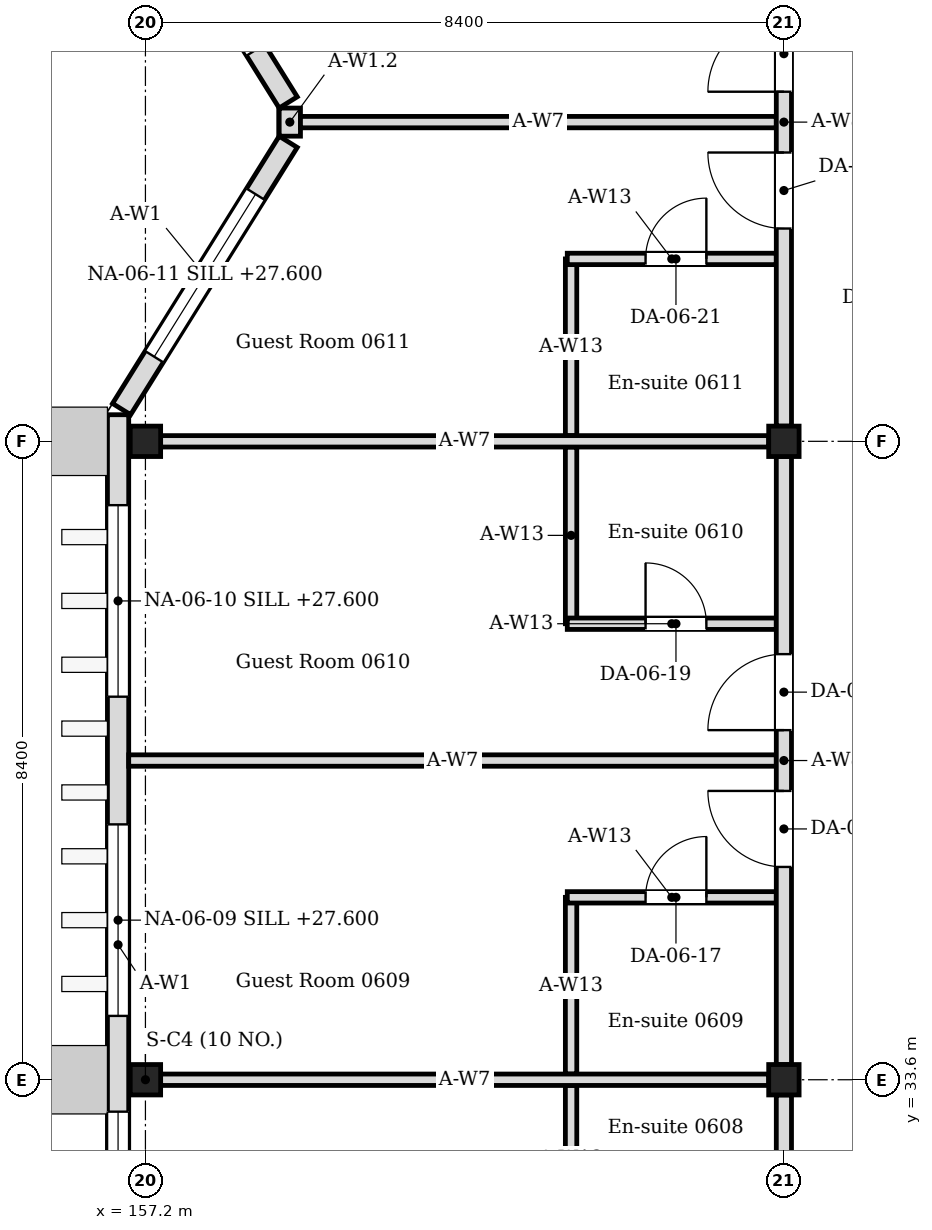
"""IFC4 building model, lengths in metres.
Left out: names, types, materials, properties, quantities, classifications, styles, units other than length and angle.
Written with IfcOpenShell. Run it as: python <this file> out.ifc"""

import sys

from ifc_helpers import new_model, si_unit, direction, frame, frame_2d, origin, origin_2d, place, context, subcontext, project, spatial, rectangle, i_section, extrude, element, fill, save


model = new_model("IFC4")
c1 = context("Model", 3, precision=1e-05, world=origin(), true_north=direction((0.0, 1.0)))
c2 = subcontext(c1, "Body", "Model", "MODEL_VIEW")
j1 = project(units=[si_unit("LENGTHUNIT", "METRE"), si_unit("PLANEANGLEUNIT", "RADIAN")], contexts=[c1])
p1 = place(None, origin())
s1 = spatial("IfcSite", under=j1, at=p1, CompositionType="ELEMENT")
p2 = place(p1, origin())
s2 = spatial("IfcBuilding", under=s1, at=p2, CompositionType="ELEMENT")
p3 = place(p2, frame((0.0, 0.0, 27.0)))
s3 = spatial("IfcBuildingStorey", under=s2, at=p3, CompositionType="ELEMENT", Elevation=27.0)
for number, where, z_axis, x_axis in (
    (1, (157.2, 33.6, 0.0), (0.0, 0.0, 1.0), (1.0, 0.0, 0.0)),
    (2, (157.2, 42.0, 0.0), (0.0, 0.0, 1.0), (1.0, 0.0, 0.0)),
    (3, (165.6, 33.6, 0.0), (0.0, 0.0, 1.0), (1.0, 0.0, 0.0)),
    (4, (165.6, 42.0, 0.0), (0.0, 0.0, 1.0), (1.0, 0.0, 0.0)),
):
    element("IfcColumn", number, at=place(p3, frame(where, z_axis=z_axis, x_axis=x_axis)), inside=s3, PredefinedType="COLUMN", context=c2, shape_type="SweptSolid", body=[
        extrude(i_section(OverallWidth=0.4, OverallDepth=0.4, WebThickness=0.013, FlangeThickness=0.021, FilletRadius=0.022, at=origin_2d()), origin(), (0.0, 0.0, 1.0), 4.2),
    ])
p4 = place(p3, frame((156.84, 16.45, 0.0), z_axis=(0.0, 0.0, 1.0), x_axis=(0.0, 1.0, 0.0)))
e5 = element("IfcWall", 5, at=p4, inside=s3, PredefinedType="SOLIDWALL", context=c2, shape_type="SweptSolid", body=[
    extrude(rectangle(XDim=25.9, YDim=0.28, at=frame_2d((12.95, 0.0))), origin(), (0.0, 0.0, 1.0), 4.05),
])
p5 = place(p4, frame((1.19, 0.0, 0.6)))
e6 = element("IfcOpeningElement", 6, at=p5, cuts=e5, PredefinedType="OPENING", context=c2, shape_type="SweptSolid", body=[
    extrude(rectangle(XDim=2.52, YDim=2.4, at=frame_2d((1.26, 1.2))), frame((0.0, 0.15, 0.0), z_axis=(0.0, -1.0, 0.0), x_axis=(1.0, 0.0, 0.0)), (0.0, 0.0, 1.0), 0.3),
])
p6 = place(p4, frame((5.39, 0.0, 0.6)))
e7 = element("IfcOpeningElement", 7, at=p6, cuts=e5, PredefinedType="OPENING", context=c2, shape_type="SweptSolid", body=[
    extrude(rectangle(XDim=2.52, YDim=2.4, at=frame_2d((1.26, 1.2))), frame((0.0, 0.15, 0.0), z_axis=(0.0, -1.0, 0.0), x_axis=(1.0, 0.0, 0.0)), (0.0, 0.0, 1.0), 0.3),
])
p7 = place(p4, frame((10.01, 0.0, 0.6)))
e8 = element("IfcOpeningElement", 8, at=p7, cuts=e5, PredefinedType="OPENING", context=c2, shape_type="SweptSolid", body=[
    extrude(rectangle(XDim=2.52, YDim=2.4, at=frame_2d((1.26, 1.2))), frame((0.0, 0.15, 0.0), z_axis=(0.0, -1.0, 0.0), x_axis=(1.0, 0.0, 0.0)), (0.0, 0.0, 1.0), 0.3),
])
p8 = place(p4, frame((14.21, 0.0, 0.6)))
e9 = element("IfcOpeningElement", 9, at=p8, cuts=e5, PredefinedType="OPENING", context=c2, shape_type="SweptSolid", body=[
    extrude(rectangle(XDim=2.52, YDim=2.4, at=frame_2d((1.26, 1.2))), frame((0.0, 0.15, 0.0), z_axis=(0.0, -1.0, 0.0), x_axis=(1.0, 0.0, 0.0)), (0.0, 0.0, 1.0), 0.3),
])
p9 = place(p4, frame((17.99, 0.0, 0.6)))
e10 = element("IfcOpeningElement", 10, at=p9, cuts=e5, PredefinedType="OPENING", context=c2, shape_type="SweptSolid", body=[
    extrude(rectangle(XDim=2.52, YDim=2.4, at=frame_2d((1.26, 1.2))), frame((0.0, 0.15, 0.0), z_axis=(0.0, -1.0, 0.0), x_axis=(1.0, 0.0, 0.0)), (0.0, 0.0, 1.0), 0.3),
])
p10 = place(p4, frame((22.19, 0.0, 0.6)))
e11 = element("IfcOpeningElement", 11, at=p10, cuts=e5, PredefinedType="OPENING", context=c2, shape_type="SweptSolid", body=[
    extrude(rectangle(XDim=2.52, YDim=2.4, at=frame_2d((1.26, 1.2))), frame((0.0, 0.15, 0.0), z_axis=(0.0, -1.0, 0.0), x_axis=(1.0, 0.0, 0.0)), (0.0, 0.0, 1.0), 0.3),
])
p11 = place(p3, frame((156.886, 42.424, 0.0), z_axis=(0.0, 0.0, 1.0), x_axis=(0.529018946142, 0.848610013271, 0.0)))
e12 = element("IfcWall", 12, at=p11, inside=s3, PredefinedType="SOLIDWALL", context=c2, shape_type="SweptSolid", body=[
    extrude(rectangle(XDim=4.144, YDim=0.28, at=frame_2d((2.072, 0.0))), origin(), (0.0, 0.0, 1.0), 4.05),
])
p12 = place(p11, frame((0.812, 0.0, 0.6)))
e13 = element("IfcOpeningElement", 13, at=p12, cuts=e12, PredefinedType="OPENING", context=c2, shape_type="SweptSolid", body=[
    extrude(rectangle(XDim=2.52, YDim=2.4, at=frame_2d((1.26, 1.2))), frame((0.0, 0.15, 0.0), z_axis=(0.0, -1.0, 0.0), x_axis=(1.0, 0.0, 0.0)), (0.0, 0.0, 1.0), 0.3),
])
p13 = place(p3, frame((159.079, 46.459, 0.0), z_axis=(0.0, 0.0, 1.0), x_axis=(-0.529018946142, 0.848610013271, 0.0)))
e14 = element("IfcWall", 14, at=p13, inside=s3, PredefinedType="SOLIDWALL", context=c2, shape_type="SweptSolid", body=[
    extrude(rectangle(XDim=4.144, YDim=0.28, at=frame_2d((2.072, 0.0))), origin(), (0.0, 0.0, 1.0), 4.05),
])
p14 = place(p13, frame((0.812, 0.0, 0.6)))
e15 = element("IfcOpeningElement", 15, at=p14, cuts=e14, PredefinedType="OPENING", context=c2, shape_type="SweptSolid", body=[
    extrude(rectangle(XDim=2.52, YDim=2.4, at=frame_2d((1.26, 1.2))), frame((0.0, 0.15, 0.0), z_axis=(0.0, -1.0, 0.0), x_axis=(1.0, 0.0, 0.0)), (0.0, 0.0, 1.0), 0.3),
])
p15 = place(p3, frame((159.1, 46.015, 0.0), z_axis=(0.0, 0.0, 1.0), x_axis=(0.0, 1.0, 0.0)))
e16 = element("IfcWall", 16, at=p15, inside=s3, PredefinedType="SOLIDWALL", context=c2, shape_type="SweptSolid", body=[
    extrude(rectangle(XDim=0.37, YDim=0.28, at=frame_2d((0.185, 0.0))), origin(), (0.0, 0.0, 1.0), 3.604),
])
p16 = place(p3, frame((162.8, 31.6, 0.0), z_axis=(0.0, 0.0, 1.0), x_axis=(0.0, 1.0, 0.0)))
e17 = element("IfcWall", 17, at=p16, inside=s3, PredefinedType="PARTITIONING", context=c2, shape_type="SweptSolid", body=[
    extrude(rectangle(XDim=1.925, YDim=0.15, at=frame_2d((0.962, 0.0))), origin(), (0.0, 0.0, 1.0), 4.05),
])
p17 = place(p3, frame((162.8, 33.675, 0.0), z_axis=(0.0, 0.0, 1.0), x_axis=(0.0, 1.0, 0.0)))
e18 = element("IfcWall", 18, at=p17, inside=s3, PredefinedType="PARTITIONING", context=c2, shape_type="SweptSolid", body=[
    extrude(rectangle(XDim=2.325, YDim=0.15, at=frame_2d((1.163, 0.0))), origin(), (0.0, 0.0, 1.0), 4.05),
])
p18 = place(p3, frame((162.75, 36.0, 0.0), z_axis=(0.0, 0.0, 1.0), x_axis=(1.0, 0.0, 0.0)))
e19 = element("IfcWall", 19, at=p18, inside=s3, PredefinedType="PARTITIONING", context=c2, shape_type="SweptSolid", body=[
    extrude(rectangle(XDim=2.75, YDim=0.15, at=frame_2d((1.375, 0.0))), origin(), (0.0, 0.0, 1.0), 4.05),
])
p19 = place(p18, frame((1.03, 0.0, 0.0)))
e20 = element("IfcOpeningElement", 20, at=p19, cuts=e19, PredefinedType="OPENING", context=c2, shape_type="SweptSolid", body=[
    extrude(rectangle(XDim=0.8, YDim=2.1, at=frame_2d((0.4, 1.05))), frame((0.0, 0.085, 0.0), z_axis=(0.0, -1.0, 0.0), x_axis=(1.0, 0.0, 0.0)), (0.0, 0.0, 1.0), 0.17),
])
p20 = place(p3, frame((162.8, 39.6, 0.0), z_axis=(0.0, 0.0, 1.0), x_axis=(0.0, 1.0, 0.0)))
e21 = element("IfcWall", 21, at=p20, inside=s3, PredefinedType="PARTITIONING", context=c2, shape_type="SweptSolid", body=[
    extrude(rectangle(XDim=2.325, YDim=0.15, at=frame_2d((1.163, 0.0))), origin(), (0.0, 0.0, 1.0), 4.05),
])
p21 = place(p3, frame((162.75, 39.6, 0.0), z_axis=(0.0, 0.0, 1.0), x_axis=(1.0, 0.0, 0.0)))
e22 = element("IfcWall", 22, at=p21, inside=s3, PredefinedType="PARTITIONING", context=c2, shape_type="SweptSolid", body=[
    extrude(rectangle(XDim=2.75, YDim=0.15, at=frame_2d((1.375, 0.0))), origin(), (0.0, 0.0, 1.0), 4.05),
])
p22 = place(p21, frame((1.03, 0.0, 0.0)))
e23 = element("IfcOpeningElement", 23, at=p22, cuts=e22, PredefinedType="OPENING", context=c2, shape_type="SweptSolid", body=[
    extrude(rectangle(XDim=0.8, YDim=2.1, at=frame_2d((0.4, 1.05))), frame((0.0, 0.085, 0.0), z_axis=(0.0, -1.0, 0.0), x_axis=(1.0, 0.0, 0.0)), (0.0, 0.0, 1.0), 0.17),
])
p23 = place(p3, frame((162.8, 42.075, 0.0), z_axis=(0.0, 0.0, 1.0), x_axis=(0.0, 1.0, 0.0)))
e24 = element("IfcWall", 24, at=p23, inside=s3, PredefinedType="PARTITIONING", context=c2, shape_type="SweptSolid", body=[
    extrude(rectangle(XDim=2.325, YDim=0.15, at=frame_2d((1.163, 0.0))), origin(), (0.0, 0.0, 1.0), 4.05),
])
p24 = place(p3, frame((162.75, 44.4, 0.0), z_axis=(0.0, 0.0, 1.0), x_axis=(1.0, 0.0, 0.0)))
e25 = element("IfcWall", 25, at=p24, inside=s3, PredefinedType="PARTITIONING", context=c2, shape_type="SweptSolid", body=[
    extrude(rectangle(XDim=2.75, YDim=0.15, at=frame_2d((1.375, 0.0))), origin(), (0.0, 0.0, 1.0), 4.05),
])
p25 = place(p24, frame((1.03, 0.0, 0.0)))
e26 = element("IfcOpeningElement", 26, at=p25, cuts=e25, PredefinedType="OPENING", context=c2, shape_type="SweptSolid", body=[
    extrude(rectangle(XDim=0.8, YDim=2.1, at=frame_2d((0.4, 1.05))), frame((0.0, 0.085, 0.0), z_axis=(0.0, -1.0, 0.0), x_axis=(1.0, 0.0, 0.0)), (0.0, 0.0, 1.0), 0.17),
])
for number, where, z_axis, x_axis in (
    (27, (157.4, 33.6, 0.0), (0.0, 0.0, 1.0), (1.0, 0.0, 0.0)),
    (28, (157.4, 42.0, 0.0), (0.0, 0.0, 1.0), (1.0, 0.0, 0.0)),
):
    element("IfcWall", number, at=place(p3, frame(where, z_axis=z_axis, x_axis=x_axis)), inside=s3, PredefinedType="PARTITIONING", context=c2, shape_type="SweptSolid", body=[
        extrude(rectangle(XDim=8.0, YDim=0.15, at=frame_2d((4.0, 0.0))), origin(), (0.0, 0.0, 1.0), 3.604),
    ])
p26 = place(p3, frame((156.98, 37.8, 0.0), z_axis=(0.0, 0.0, 1.0), x_axis=(1.0, 0.0, 0.0)))
e29 = element("IfcWall", 29, at=p26, inside=s3, PredefinedType="PARTITIONING", context=c2, shape_type="SweptSolid", body=[
    extrude(rectangle(XDim=8.52, YDim=0.15, at=frame_2d((4.26, 0.0))), origin(), (0.0, 0.0, 1.0), 3.604),
])
p27 = place(p3, frame((159.24, 46.2, 0.0), z_axis=(0.0, 0.0, 1.0), x_axis=(1.0, 0.0, 0.0)))
e30 = element("IfcWall", 30, at=p27, inside=s3, PredefinedType="PARTITIONING", context=c2, shape_type="SweptSolid", body=[
    extrude(rectangle(XDim=6.26, YDim=0.15, at=frame_2d((3.13, 0.0))), origin(), (0.0, 0.0, 1.0), 3.604),
])
p28 = place(p3, frame((165.6, 25.4, 0.0), z_axis=(0.0, 0.0, 1.0), x_axis=(0.0, 1.0, 0.0)))
e31 = element("IfcWall", 31, at=p28, inside=s3, PredefinedType="PARTITIONING", context=c2, shape_type="SweptSolid", body=[
    extrude(rectangle(XDim=8.0, YDim=0.2, at=frame_2d((4.0, 0.0))), origin(), (0.0, 0.0, 1.0), 3.45),
])
p29 = place(p28, frame((3.02, 0.0, 0.0)))
e32 = element("IfcOpeningElement", 32, at=p29, cuts=e31, PredefinedType="OPENING", context=c2, shape_type="SweptSolid", body=[
    extrude(rectangle(XDim=1.0, YDim=2.4, at=frame_2d((0.5, 1.2))), frame((0.0, 0.11, 0.0), z_axis=(0.0, -1.0, 0.0), x_axis=(1.0, 0.0, 0.0)), (0.0, 0.0, 1.0), 0.22),
])
p30 = place(p28, frame((5.02, 0.0, 0.0)))
e33 = element("IfcOpeningElement", 33, at=p30, cuts=e31, PredefinedType="OPENING", context=c2, shape_type="SweptSolid", body=[
    extrude(rectangle(XDim=1.0, YDim=2.4, at=frame_2d((0.5, 1.2))), frame((0.0, 0.11, 0.0), z_axis=(0.0, -1.0, 0.0), x_axis=(1.0, 0.0, 0.0)), (0.0, 0.0, 1.0), 0.22),
])
p31 = place(p3, frame((165.6, 33.8, 0.0), z_axis=(0.0, 0.0, 1.0), x_axis=(0.0, 1.0, 0.0)))
e34 = element("IfcWall", 34, at=p31, inside=s3, PredefinedType="PARTITIONING", context=c2, shape_type="SweptSolid", body=[
    extrude(rectangle(XDim=8.0, YDim=0.2, at=frame_2d((4.0, 0.0))), origin(), (0.0, 0.0, 1.0), 3.45),
])
p32 = place(p31, frame((2.6, 0.0, 0.0)))
e35 = element("IfcOpeningElement", 35, at=p32, cuts=e34, PredefinedType="OPENING", context=c2, shape_type="SweptSolid", body=[
    extrude(rectangle(XDim=1.0, YDim=2.4, at=frame_2d((0.5, 1.2))), frame((0.0, 0.11, 0.0), z_axis=(0.0, -1.0, 0.0), x_axis=(1.0, 0.0, 0.0)), (0.0, 0.0, 1.0), 0.22),
])
p33 = place(p31, frame((4.4, 0.0, 0.0)))
e36 = element("IfcOpeningElement", 36, at=p33, cuts=e34, PredefinedType="OPENING", context=c2, shape_type="SweptSolid", body=[
    extrude(rectangle(XDim=1.0, YDim=2.4, at=frame_2d((0.5, 1.2))), frame((0.0, 0.11, 0.0), z_axis=(0.0, -1.0, 0.0), x_axis=(1.0, 0.0, 0.0)), (0.0, 0.0, 1.0), 0.22),
])
p34 = place(p3, frame((165.6, 42.2, 0.0), z_axis=(0.0, 0.0, 1.0), x_axis=(0.0, 1.0, 0.0)))
e37 = element("IfcWall", 37, at=p34, inside=s3, PredefinedType="PARTITIONING", context=c2, shape_type="SweptSolid", body=[
    extrude(rectangle(XDim=8.0, YDim=0.2, at=frame_2d((4.0, 0.0))), origin(), (0.0, 0.0, 1.0), 3.45),
])
p35 = place(p34, frame((2.6, 0.0, 0.0)))
e38 = element("IfcOpeningElement", 38, at=p35, cuts=e37, PredefinedType="OPENING", context=c2, shape_type="SweptSolid", body=[
    extrude(rectangle(XDim=1.0, YDim=2.4, at=frame_2d((0.5, 1.2))), frame((0.0, 0.11, 0.0), z_axis=(0.0, -1.0, 0.0), x_axis=(1.0, 0.0, 0.0)), (0.0, 0.0, 1.0), 0.22),
])
p36 = place(p34, frame((4.4, 0.0, 0.0)))
e39 = element("IfcOpeningElement", 39, at=p36, cuts=e37, PredefinedType="OPENING", context=c2, shape_type="SweptSolid", body=[
    extrude(rectangle(XDim=1.0, YDim=2.4, at=frame_2d((0.5, 1.2))), frame((0.0, 0.11, 0.0), z_axis=(0.0, -1.0, 0.0), x_axis=(1.0, 0.0, 0.0)), (0.0, 0.0, 1.0), 0.22),
])
p37 = place(p8, origin())
e40 = element("IfcWindow", 40, at=p37, inside=s3, PartitioningType="SINGLE_PANEL", PredefinedType="WINDOW", context=c2, shape_type="SweptSolid", body=[
    extrude(rectangle(XDim=2.52, YDim=2.4, at=frame_2d((1.26, 1.2))), frame((0.0, 0.03, 0.0), z_axis=(0.0, -1.0, 0.0), x_axis=(1.0, 0.0, 0.0)), (0.0, 0.0, 1.0), 0.06),
])
fill(e9, e40)
p38 = place(p9, origin())
e41 = element("IfcWindow", 41, at=p38, inside=s3, PartitioningType="SINGLE_PANEL", PredefinedType="WINDOW", context=c2, shape_type="SweptSolid", body=[
    extrude(rectangle(XDim=2.52, YDim=2.4, at=frame_2d((1.26, 1.2))), frame((0.0, 0.03, 0.0), z_axis=(0.0, -1.0, 0.0), x_axis=(1.0, 0.0, 0.0)), (0.0, 0.0, 1.0), 0.06),
])
fill(e10, e41)
p39 = place(p10, origin())
e42 = element("IfcWindow", 42, at=p39, inside=s3, PartitioningType="SINGLE_PANEL", PredefinedType="WINDOW", context=c2, shape_type="SweptSolid", body=[
    extrude(rectangle(XDim=2.52, YDim=2.4, at=frame_2d((1.26, 1.2))), frame((0.0, 0.03, 0.0), z_axis=(0.0, -1.0, 0.0), x_axis=(1.0, 0.0, 0.0)), (0.0, 0.0, 1.0), 0.06),
])
fill(e11, e42)
p40 = place(p12, origin())
e43 = element("IfcWindow", 43, at=p40, inside=s3, PartitioningType="SINGLE_PANEL", PredefinedType="WINDOW", context=c2, shape_type="SweptSolid", body=[
    extrude(rectangle(XDim=2.52, YDim=2.4, at=frame_2d((1.26, 1.2))), frame((0.0, 0.03, 0.0), z_axis=(0.0, -1.0, 0.0), x_axis=(1.0, 0.0, 0.0)), (0.0, 0.0, 1.0), 0.06),
])
fill(e13, e43)
p41 = place(p19, origin())
e44 = element("IfcDoor", 44, at=p41, inside=s3, OperationType="SINGLE_SWING_RIGHT", PredefinedType="DOOR", context=c2, shape_type="SweptSolid", body=[
    extrude(rectangle(XDim=0.8, YDim=2.1, at=frame_2d((0.4, 1.05))), frame((0.0, 0.025, 0.0), z_axis=(0.0, -1.0, 0.0), x_axis=(1.0, 0.0, 0.0)), (0.0, 0.0, 1.0), 0.05),
])
fill(e20, e44)
p42 = place(p32, origin())
e45 = element("IfcDoor", 45, at=p42, inside=s3, OperationType="SINGLE_SWING_RIGHT", PredefinedType="DOOR", context=c2, shape_type="SweptSolid", body=[
    extrude(rectangle(XDim=1.0, YDim=2.4, at=frame_2d((0.5, 1.2))), frame((0.0, 0.025, 0.0), z_axis=(0.0, -1.0, 0.0), x_axis=(1.0, 0.0, 0.0)), (0.0, 0.0, 1.0), 0.05),
])
fill(e35, e45)
p43 = place(p22, origin())
e46 = element("IfcDoor", 46, at=p43, inside=s3, OperationType="SINGLE_SWING_LEFT", PredefinedType="DOOR", context=c2, shape_type="SweptSolid", body=[
    extrude(rectangle(XDim=0.8, YDim=2.1, at=frame_2d((0.4, 1.05))), frame((0.0, 0.025, 0.0), z_axis=(0.0, -1.0, 0.0), x_axis=(1.0, 0.0, 0.0)), (0.0, 0.0, 1.0), 0.05),
])
fill(e23, e46)
p44 = place(p33, origin())
e47 = element("IfcDoor", 47, at=p44, inside=s3, OperationType="SINGLE_SWING_LEFT", PredefinedType="DOOR", context=c2, shape_type="SweptSolid", body=[
    extrude(rectangle(XDim=1.0, YDim=2.4, at=frame_2d((0.5, 1.2))), frame((0.0, 0.025, 0.0), z_axis=(0.0, -1.0, 0.0), x_axis=(1.0, 0.0, 0.0)), (0.0, 0.0, 1.0), 0.05),
])
fill(e36, e47)
p45 = place(p25, origin())
e48 = element("IfcDoor", 48, at=p45, inside=s3, OperationType="SINGLE_SWING_RIGHT", PredefinedType="DOOR", context=c2, shape_type="SweptSolid", body=[
    extrude(rectangle(XDim=0.8, YDim=2.1, at=frame_2d((0.4, 1.05))), frame((0.0, 0.025, 0.0), z_axis=(0.0, -1.0, 0.0), x_axis=(1.0, 0.0, 0.0)), (0.0, 0.0, 1.0), 0.05),
])
fill(e26, e48)
p46 = place(p35, origin())
e49 = element("IfcDoor", 49, at=p46, inside=s3, OperationType="SINGLE_SWING_RIGHT", PredefinedType="DOOR", context=c2, shape_type="SweptSolid", body=[
    extrude(rectangle(XDim=1.0, YDim=2.4, at=frame_2d((0.5, 1.2))), frame((0.0, 0.025, 0.0), z_axis=(0.0, -1.0, 0.0), x_axis=(1.0, 0.0, 0.0)), (0.0, 0.0, 1.0), 0.05),
])
fill(e38, e49)
p47 = place(p36, origin())
e50 = element("IfcDoor", 50, at=p47, inside=s3, OperationType="SINGLE_SWING_LEFT", PredefinedType="DOOR", context=c2, shape_type="SweptSolid", body=[
    extrude(rectangle(XDim=1.0, YDim=2.4, at=frame_2d((0.5, 1.2))), frame((0.0, 0.025, 0.0), z_axis=(0.0, -1.0, 0.0), x_axis=(1.0, 0.0, 0.0)), (0.0, 0.0, 1.0), 0.05),
])
fill(e39, e50)
save(model, sys.argv[1])
